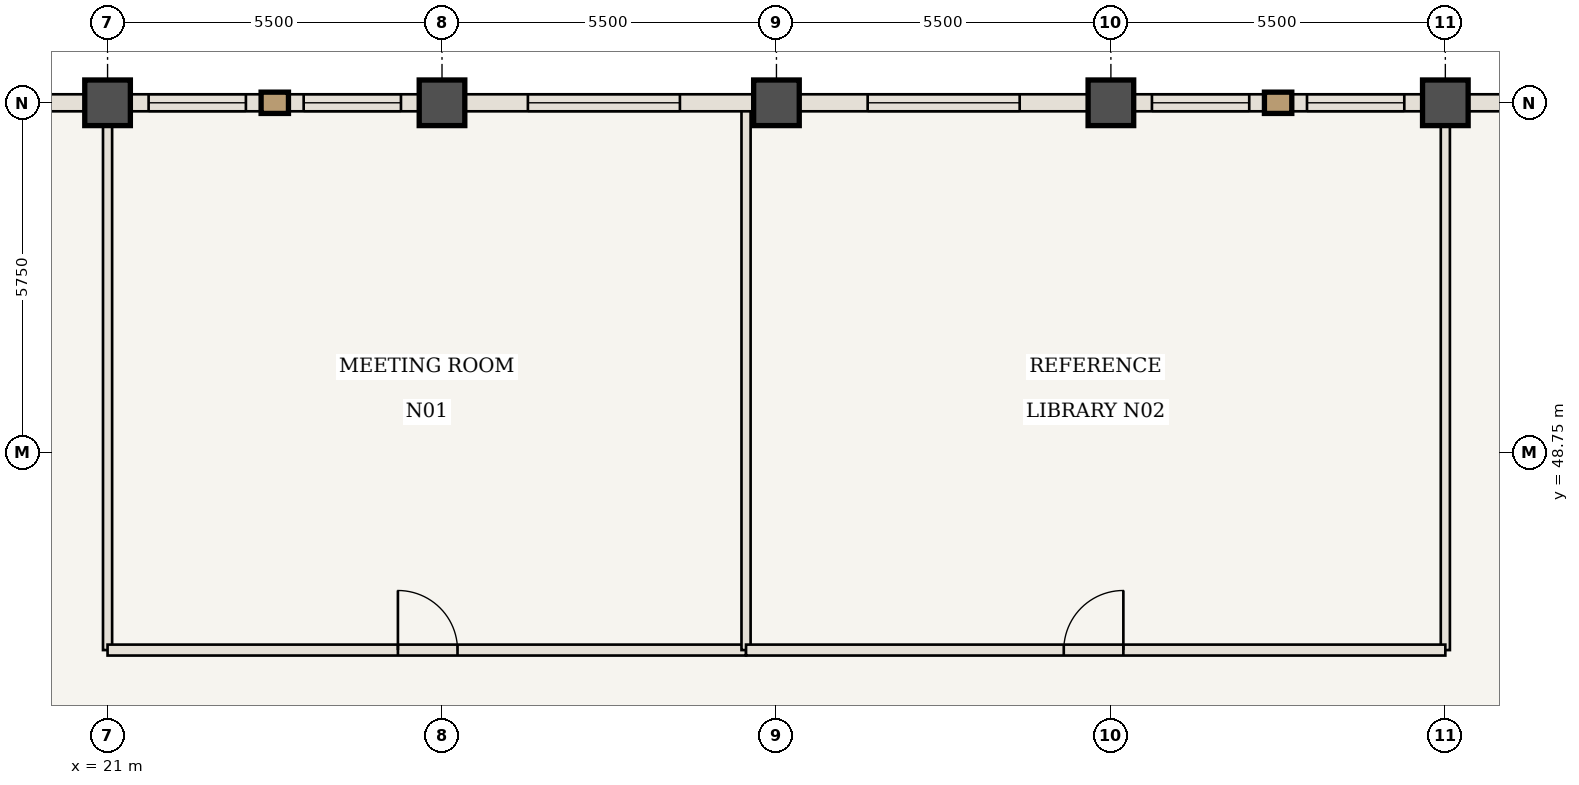
"""IFC4 building model, lengths in metres.
Left out: names, types, materials, properties, quantities, classifications, styles, units other than length and angle.
Written with IfcOpenShell. Run it as: python <this file> out.ifc"""

import sys

from ifc_helpers import new_model, si_unit, direction, frame, frame_2d, origin, origin_2d, place, context, subcontext, project, spatial, rectangle, extrude, element, fill, save


model = new_model("IFC4")
c1 = context("Model", 3, precision=1e-05, world=origin(), true_north=direction((0.0, 1.0)))
c2 = subcontext(c1, "Body", "Model", "MODEL_VIEW")
j1 = project(units=[si_unit("LENGTHUNIT", "METRE"), si_unit("PLANEANGLEUNIT", "RADIAN")], contexts=[c1])
p1 = place(None, origin())
s1 = spatial("IfcSite", under=j1, at=p1, CompositionType="ELEMENT")
p2 = place(p1, origin())
s2 = spatial("IfcBuilding", under=s1, at=p2, CompositionType="ELEMENT")
p3 = place(p2, frame((0.0, 0.0, 266.0)))
s3 = spatial("IfcBuildingStorey", under=s2, at=p3, CompositionType="ELEMENT", Elevation=266.0)
for number, where, z_axis, x_axis in (
    (1, (21.0, 54.5, 0.0), (0.0, 0.0, 1.0), (1.0, 0.0, 0.0)),
    (2, (26.5, 54.5, 0.0), (0.0, 0.0, 1.0), (1.0, 0.0, 0.0)),
    (3, (32.0, 54.5, 0.0), (0.0, 0.0, 1.0), (1.0, 0.0, 0.0)),
    (4, (37.5, 54.5, 0.0), (0.0, 0.0, 1.0), (1.0, 0.0, 0.0)),
    (5, (43.0, 54.5, 0.0), (0.0, 0.0, 1.0), (1.0, 0.0, 0.0)),
):
    element("IfcColumn", number, at=place(p3, frame(where, z_axis=z_axis, x_axis=x_axis)), inside=s3, PredefinedType="COLUMN", context=c2, shape_type="SweptSolid", body=[
        extrude(rectangle(XDim=0.75, YDim=0.75, at=origin_2d()), origin(), (0.0, 0.0, 1.0), 3.85),
    ])
for number, where, z_axis, x_axis in (
    (6, (21.0, 45.5, 0.0), (0.0, 0.0, 1.0), (0.0, 1.0, 0.0)),
    (7, (43.0, 45.5, 0.0), (0.0, 0.0, 1.0), (0.0, 1.0, 0.0)),
):
    element("IfcWall", number, at=place(p3, frame(where, z_axis=z_axis, x_axis=x_axis)), inside=s3, PredefinedType="STANDARD", context=c2, shape_type="SweptSolid", body=[
        extrude(rectangle(XDim=8.94, YDim=0.15, at=frame_2d((4.47, 0.0))), origin(), (0.0, 0.0, 1.0), 3.685),
    ])
p4 = place(p3, frame((21.0, 45.5, 0.0), z_axis=(0.0, 0.0, 1.0), x_axis=(1.0, 0.0, 0.0)))
e8 = element("IfcWall", 8, at=p4, inside=s3, PredefinedType="STANDARD", context=c2, shape_type="SweptSolid", body=[
    extrude(rectangle(XDim=10.5, YDim=0.18, at=frame_2d((5.25, 0.0))), origin(), (0.0, 0.0, 1.0), 3.685),
])
p5 = place(p4, frame((4.775, 0.0, 0.0)))
e9 = element("IfcOpeningElement", 9, at=p5, cuts=e8, PredefinedType="OPENING", context=c2, shape_type="SweptSolid", body=[
    extrude(rectangle(XDim=0.98, YDim=2.2, at=frame_2d((0.49, 1.1))), frame((0.0, 0.1, 0.0), z_axis=(0.0, -1.0, 0.0), x_axis=(1.0, 0.0, 0.0)), (0.0, 0.0, 1.0), 0.2),
])
p6 = place(p3, frame((31.5, 45.5, 0.0), z_axis=(0.0, 0.0, 1.0), x_axis=(0.0, 1.0, 0.0)))
e10 = element("IfcWall", 10, at=p6, inside=s3, PredefinedType="STANDARD", context=c2, shape_type="SweptSolid", body=[
    extrude(rectangle(XDim=8.94, YDim=0.15, at=frame_2d((4.47, 0.0))), origin(), (0.0, 0.0, 1.0), 3.685),
])
p7 = place(p3, frame((31.5, 45.5, 0.0), z_axis=(0.0, 0.0, 1.0), x_axis=(1.0, 0.0, 0.0)))
e11 = element("IfcWall", 11, at=p7, inside=s3, PredefinedType="STANDARD", context=c2, shape_type="SweptSolid", body=[
    extrude(rectangle(XDim=11.5, YDim=0.18, at=frame_2d((5.75, 0.0))), origin(), (0.0, 0.0, 1.0), 3.685),
])
p8 = place(p7, frame((5.225, 0.0, 0.0)))
e12 = element("IfcOpeningElement", 12, at=p8, cuts=e11, PredefinedType="OPENING", context=c2, shape_type="SweptSolid", body=[
    extrude(rectangle(XDim=0.98, YDim=2.2, at=frame_2d((0.49, 1.1))), frame((0.0, 0.1, 0.0), z_axis=(0.0, -1.0, 0.0), x_axis=(1.0, 0.0, 0.0)), (0.0, 0.0, 1.0), 0.2),
])
p9 = place(p3, frame((15.5, 54.5, 0.0), z_axis=(0.0, 0.0, 1.0), x_axis=(1.0, 0.0, 0.0)))
e13 = element("IfcWall", 13, at=p9, inside=s3, PredefinedType="USERDEFINED", context=c2, shape_type="SweptSolid", body=[
    extrude(rectangle(XDim=5.5, YDim=0.28, at=frame_2d((2.75, 0.0))), origin(), (0.0, 0.0, 1.0), 2.985),
])
p10 = place(p3, frame((21.0, 54.5, 0.0), z_axis=(0.0, 0.0, 1.0), x_axis=(1.0, 0.0, 0.0)))
e14 = element("IfcWall", 14, at=p10, inside=s3, PredefinedType="USERDEFINED", context=c2, shape_type="SweptSolid", body=[
    extrude(rectangle(XDim=5.5, YDim=0.28, at=frame_2d((2.75, 0.0))), origin(), (0.0, 0.0, 1.0), 2.985),
])
p11 = place(p10, frame((0.675, 0.0, 0.85)))
e15 = element("IfcOpeningElement", 15, at=p11, cuts=e14, PredefinedType="OPENING", context=c2, shape_type="SweptSolid", body=[
    extrude(rectangle(XDim=1.6, YDim=1.935, at=frame_2d((0.8, 0.968))), frame((0.0, 0.15, 0.0), z_axis=(0.0, -1.0, 0.0), x_axis=(1.0, 0.0, 0.0)), (0.0, 0.0, 1.0), 0.3),
])
p12 = place(p10, frame((3.225, 0.0, 0.85)))
e16 = element("IfcOpeningElement", 16, at=p12, cuts=e14, PredefinedType="OPENING", context=c2, shape_type="SweptSolid", body=[
    extrude(rectangle(XDim=1.6, YDim=1.935, at=frame_2d((0.8, 0.968))), frame((0.0, 0.15, 0.0), z_axis=(0.0, -1.0, 0.0), x_axis=(1.0, 0.0, 0.0)), (0.0, 0.0, 1.0), 0.3),
])
p13 = place(p3, frame((26.5, 54.5, 0.0), z_axis=(0.0, 0.0, 1.0), x_axis=(1.0, 0.0, 0.0)))
e17 = element("IfcWall", 17, at=p13, inside=s3, PredefinedType="USERDEFINED", context=c2, shape_type="SweptSolid", body=[
    extrude(rectangle(XDim=5.5, YDim=0.28, at=frame_2d((2.75, 0.0))), origin(), (0.0, 0.0, 1.0), 2.985),
])
p14 = place(p13, frame((1.413, 0.0, 0.85)))
e18 = element("IfcOpeningElement", 18, at=p14, cuts=e17, PredefinedType="OPENING", context=c2, shape_type="SweptSolid", body=[
    extrude(rectangle(XDim=2.5, YDim=1.935, at=frame_2d((1.25, 0.968))), frame((0.0, 0.15, 0.0), z_axis=(0.0, -1.0, 0.0), x_axis=(1.0, 0.0, 0.0)), (0.0, 0.0, 1.0), 0.3),
])
p15 = place(p3, frame((32.0, 54.5, 0.0), z_axis=(0.0, 0.0, 1.0), x_axis=(1.0, 0.0, 0.0)))
e19 = element("IfcWall", 19, at=p15, inside=s3, PredefinedType="USERDEFINED", context=c2, shape_type="SweptSolid", body=[
    extrude(rectangle(XDim=5.5, YDim=0.28, at=frame_2d((2.75, 0.0))), origin(), (0.0, 0.0, 1.0), 2.985),
])
p16 = place(p15, frame((1.5, 0.0, 0.85)))
e20 = element("IfcOpeningElement", 20, at=p16, cuts=e19, PredefinedType="OPENING", context=c2, shape_type="SweptSolid", body=[
    extrude(rectangle(XDim=2.5, YDim=1.935, at=frame_2d((1.25, 0.968))), frame((0.0, 0.15, 0.0), z_axis=(0.0, -1.0, 0.0), x_axis=(1.0, 0.0, 0.0)), (0.0, 0.0, 1.0), 0.3),
])
p17 = place(p3, frame((37.5, 54.5, 0.0), z_axis=(0.0, 0.0, 1.0), x_axis=(1.0, 0.0, 0.0)))
e21 = element("IfcWall", 21, at=p17, inside=s3, PredefinedType="USERDEFINED", context=c2, shape_type="SweptSolid", body=[
    extrude(rectangle(XDim=5.5, YDim=0.28, at=frame_2d((2.75, 0.0))), origin(), (0.0, 0.0, 1.0), 2.985),
])
p18 = place(p17, frame((0.675, 0.0, 0.85)))
e22 = element("IfcOpeningElement", 22, at=p18, cuts=e21, PredefinedType="OPENING", context=c2, shape_type="SweptSolid", body=[
    extrude(rectangle(XDim=1.6, YDim=1.935, at=frame_2d((0.8, 0.968))), frame((0.0, 0.15, 0.0), z_axis=(0.0, -1.0, 0.0), x_axis=(1.0, 0.0, 0.0)), (0.0, 0.0, 1.0), 0.3),
])
p19 = place(p17, frame((3.225, 0.0, 0.85)))
e23 = element("IfcOpeningElement", 23, at=p19, cuts=e21, PredefinedType="OPENING", context=c2, shape_type="SweptSolid", body=[
    extrude(rectangle(XDim=1.6, YDim=1.935, at=frame_2d((0.8, 0.968))), frame((0.0, 0.15, 0.0), z_axis=(0.0, -1.0, 0.0), x_axis=(1.0, 0.0, 0.0)), (0.0, 0.0, 1.0), 0.3),
])
p20 = place(p3, frame((43.0, 54.5, 0.0), z_axis=(0.0, 0.0, 1.0), x_axis=(1.0, 0.0, 0.0)))
e24 = element("IfcWall", 24, at=p20, inside=s3, PredefinedType="USERDEFINED", context=c2, shape_type="SweptSolid", body=[
    extrude(rectangle(XDim=5.5, YDim=0.28, at=frame_2d((2.75, 0.0))), origin(), (0.0, 0.0, 1.0), 2.985),
])
p21 = place(p5, origin())
e25 = element("IfcDoor", 25, at=p21, inside=s3, OperationType="SINGLE_SWING_LEFT", PredefinedType="DOOR", context=c2, shape_type="SweptSolid", body=[
    extrude(rectangle(XDim=0.98, YDim=2.2, at=frame_2d((0.49, 1.1))), frame((0.0, 0.025, 0.0), z_axis=(0.0, -1.0, 0.0), x_axis=(1.0, 0.0, 0.0)), (0.0, 0.0, 1.0), 0.05),
])
fill(e9, e25)
p22 = place(p8, origin())
e26 = element("IfcDoor", 26, at=p22, inside=s3, OperationType="SINGLE_SWING_RIGHT", PredefinedType="DOOR", context=c2, shape_type="SweptSolid", body=[
    extrude(rectangle(XDim=0.98, YDim=2.2, at=frame_2d((0.49, 1.1))), frame((0.0, 0.025, 0.0), z_axis=(0.0, -1.0, 0.0), x_axis=(1.0, 0.0, 0.0)), (0.0, 0.0, 1.0), 0.05),
])
fill(e12, e26)
p23 = place(p11, origin())
e27 = element("IfcWindow", 27, at=p23, inside=s3, PartitioningType="SINGLE_PANEL", PredefinedType="WINDOW", context=c2, shape_type="SweptSolid", body=[
    extrude(rectangle(XDim=1.6, YDim=1.935, at=frame_2d((0.8, 0.968))), frame((0.0, 0.03, 0.0), z_axis=(0.0, -1.0, 0.0), x_axis=(1.0, 0.0, 0.0)), (0.0, 0.0, 1.0), 0.06),
])
fill(e15, e27)
p24 = place(p12, origin())
e28 = element("IfcWindow", 28, at=p24, inside=s3, PartitioningType="SINGLE_PANEL", PredefinedType="WINDOW", context=c2, shape_type="SweptSolid", body=[
    extrude(rectangle(XDim=1.6, YDim=1.935, at=frame_2d((0.8, 0.968))), frame((0.0, 0.03, 0.0), z_axis=(0.0, -1.0, 0.0), x_axis=(1.0, 0.0, 0.0)), (0.0, 0.0, 1.0), 0.06),
])
fill(e16, e28)
p25 = place(p14, origin())
e29 = element("IfcWindow", 29, at=p25, inside=s3, PartitioningType="SINGLE_PANEL", PredefinedType="WINDOW", context=c2, shape_type="SweptSolid", body=[
    extrude(rectangle(XDim=2.5, YDim=1.935, at=frame_2d((1.25, 0.968))), frame((0.0, 0.03, 0.0), z_axis=(0.0, -1.0, 0.0), x_axis=(1.0, 0.0, 0.0)), (0.0, 0.0, 1.0), 0.06),
])
fill(e18, e29)
p26 = place(p16, origin())
e30 = element("IfcWindow", 30, at=p26, inside=s3, PartitioningType="SINGLE_PANEL", PredefinedType="WINDOW", context=c2, shape_type="SweptSolid", body=[
    extrude(rectangle(XDim=2.5, YDim=1.935, at=frame_2d((1.25, 0.968))), frame((0.0, 0.03, 0.0), z_axis=(0.0, -1.0, 0.0), x_axis=(1.0, 0.0, 0.0)), (0.0, 0.0, 1.0), 0.06),
])
fill(e20, e30)
p27 = place(p18, origin())
e31 = element("IfcWindow", 31, at=p27, inside=s3, PartitioningType="SINGLE_PANEL", PredefinedType="WINDOW", context=c2, shape_type="SweptSolid", body=[
    extrude(rectangle(XDim=1.6, YDim=1.935, at=frame_2d((0.8, 0.968))), frame((0.0, 0.03, 0.0), z_axis=(0.0, -1.0, 0.0), x_axis=(1.0, 0.0, 0.0)), (0.0, 0.0, 1.0), 0.06),
])
fill(e22, e31)
p28 = place(p19, origin())
e32 = element("IfcWindow", 32, at=p28, inside=s3, PartitioningType="SINGLE_PANEL", PredefinedType="WINDOW", context=c2, shape_type="SweptSolid", body=[
    extrude(rectangle(XDim=1.6, YDim=1.935, at=frame_2d((0.8, 0.968))), frame((0.0, 0.03, 0.0), z_axis=(0.0, -1.0, 0.0), x_axis=(1.0, 0.0, 0.0)), (0.0, 0.0, 1.0), 0.06),
])
fill(e23, e32)
save(model, sys.argv[1])
